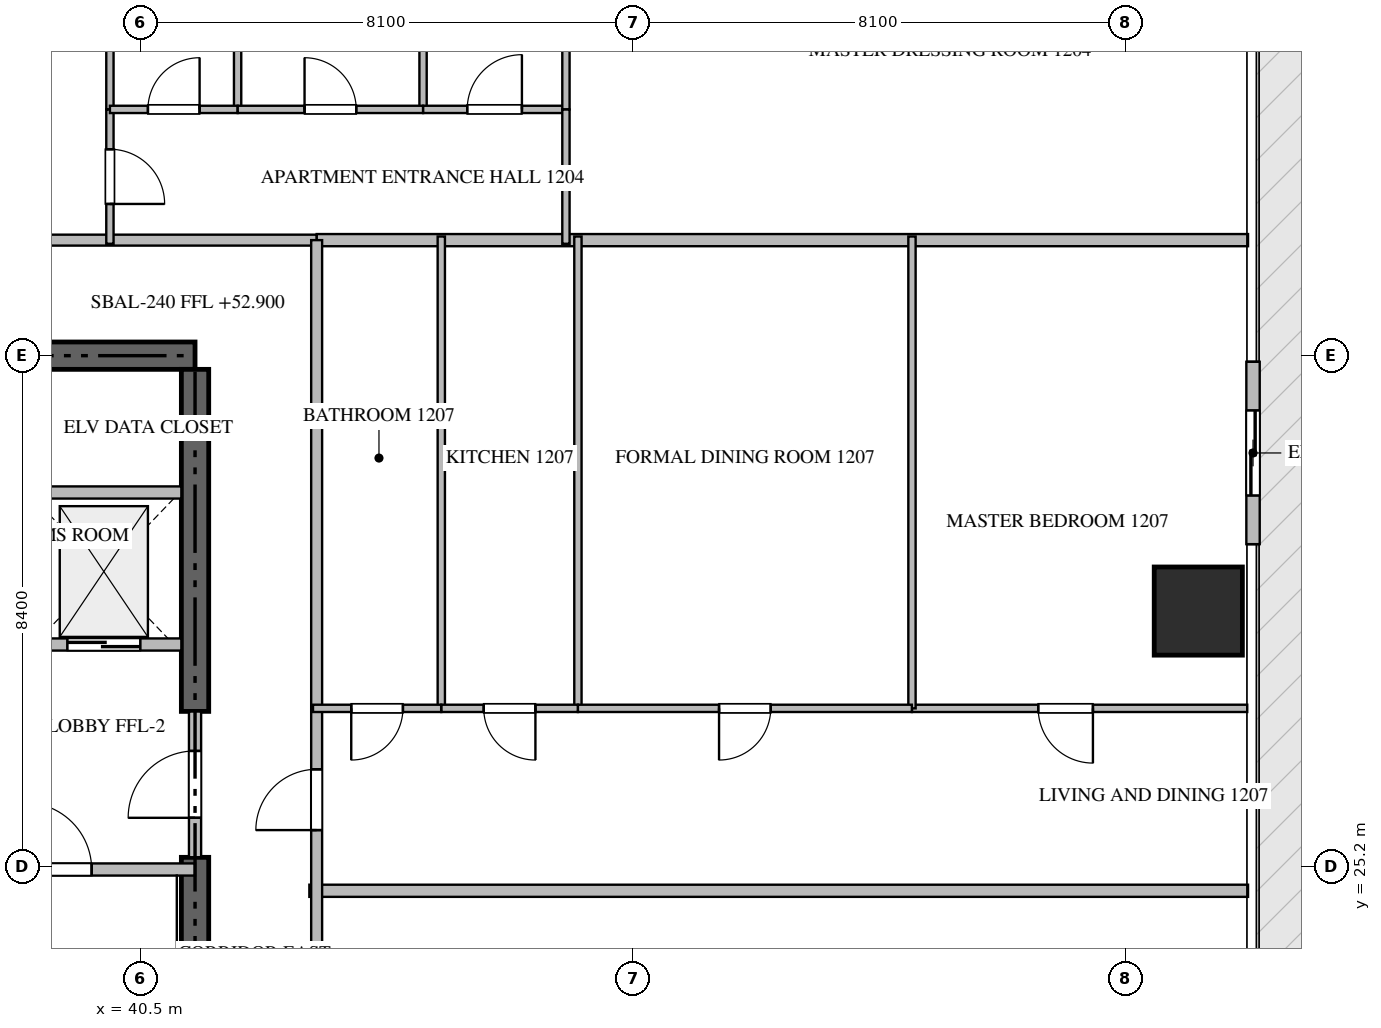
"""IFC4 building model, lengths in metres.
Left out: names, types, materials, properties, quantities, classifications, styles, units other than length and angle.
Written with IfcOpenShell. Run it as: python <this file> out.ifc"""

import sys

from ifc_helpers import new_model, si_unit, direction, frame, frame_2d, origin, origin_2d, place, context, subcontext, project, spatial, rectangle, extrude, source, transform, mapped, element, fill, save


model = new_model("IFC4")
c1 = context("Model", 3, precision=1e-05, world=origin(), true_north=direction((0.0, 1.0)))
c2 = subcontext(c1, "Body", "Model", "MODEL_VIEW")
j1 = project(units=[si_unit("LENGTHUNIT", "METRE"), si_unit("PLANEANGLEUNIT", "RADIAN")], contexts=[c1])
p1 = place(None, origin())
s1 = spatial("IfcSite", under=j1, at=p1, CompositionType="ELEMENT")
p2 = place(p1, origin())
s2 = spatial("IfcBuilding", under=s1, at=p2, CompositionType="ELEMENT")
p3 = place(p2, frame((0.0, 0.0, 52.95)))
s3 = spatial("IfcBuildingStorey", under=s2, at=p3, CompositionType="ELEMENT", Elevation=52.95)
p4 = place(p3, frame((41.4, 33.6, -0.26), z_axis=(0.0, 0.0, 1.0), x_axis=(-1.0, 0.0, 0.0)))
e1 = element("IfcWall", 1, at=p4, inside=s3, PredefinedType="SHEAR", context=c2, shape_type="SweptSolid", body=[
    extrude(rectangle(XDim=18.0, YDim=0.45, at=frame_2d((9.0, 0.0))), origin(), (0.0, 0.0, 1.0), 3.748),
])
p5 = place(p3, frame((41.4, 17.025, -0.26), z_axis=(0.0, 0.0, 1.0), x_axis=(0.0, 1.0, 0.0)))
e2 = element("IfcWall", 2, at=p5, inside=s3, PredefinedType="SHEAR", context=c2, shape_type="SweptSolid", body=[
    extrude(rectangle(XDim=8.325, YDim=0.45, at=frame_2d((4.163, 0.0))), origin(), (0.0, 0.0, 1.0), 3.748),
])
p6 = place(p3, frame((41.4, 27.75, -0.26), z_axis=(0.0, 0.0, 1.0), x_axis=(0.0, 1.0, 0.0)))
e3 = element("IfcWall", 3, at=p6, inside=s3, PredefinedType="SHEAR", context=c2, shape_type="SweptSolid", body=[
    extrude(rectangle(XDim=5.625, YDim=0.45, at=frame_2d((2.812, 0.0))), origin(), (0.0, 0.0, 1.0), 3.748),
])
m1 = source(origin(), c2, "Body", "SweptSolid", [
    extrude(rectangle(XDim=1.45, YDim=1.45, at=origin_2d()), origin(), (0.0, 0.0, 1.0), 3.75),
])
p7 = place(p3, frame((57.9, 29.4, -0.26), z_axis=(0.0, 0.0, 1.0), x_axis=(1.0, 0.0, 0.0)))
e4 = element("IfcColumn", 4, at=p7, inside=s3, PredefinedType="COLUMN", context=c2, shape_type="MappedRepresentation", body=[
    mapped(m1, transform((0.0, 0.0, 0.0), scale=1.0)),
])
p8 = place(p3, frame((58.8, 30.5, 0.0), z_axis=(0.0, 0.0, 1.0), x_axis=(0.0, 1.0, 0.0)))
e5 = element("IfcWall", 5, at=p8, inside=s3, PredefinedType="ELEMENTEDWALL", context=c2, shape_type="SweptSolid", body=[
    extrude(rectangle(XDim=3.0, YDim=0.22, at=frame_2d((1.5, 0.0))), origin(), (0.0, 0.0, 1.0), 3.475),
])
p9 = place(p8, frame((0.8, 0.0, 0.0)))
e6 = element("IfcOpeningElement", 6, at=p9, cuts=e5, PredefinedType="OPENING", context=c2, shape_type="SweptSolid", body=[
    extrude(rectangle(XDim=1.4, YDim=2.25, at=frame_2d((0.7, 1.125))), frame((0.0, 0.12, 0.0), z_axis=(0.0, -1.0, 0.0), x_axis=(1.0, 0.0, 0.0)), (0.0, 0.0, 1.0), 0.24),
])
p10 = place(p3, frame((36.95, 25.15, 0.0), z_axis=(0.0, 0.0, 1.0), x_axis=(1.0, 0.0, 0.0)))
e7 = element("IfcWall", 7, at=p10, inside=s3, PredefinedType="STANDARD", context=c2, shape_type="SweptSolid", body=[
    extrude(rectangle(XDim=4.45, YDim=0.2, at=frame_2d((2.225, 0.0))), origin(), (0.0, 0.0, 1.0), 3.49),
])
p11 = place(p10, frame((1.65, 0.0, 0.0)))
e8 = element("IfcOpeningElement", 8, at=p11, cuts=e7, PredefinedType="OPENING", context=c2, shape_type="SweptSolid", body=[
    extrude(rectangle(XDim=1.1, YDim=2.15, at=frame_2d((0.55, 1.075))), frame((0.0, 0.11, 0.0), z_axis=(0.0, -1.0, 0.0), x_axis=(1.0, 0.0, 0.0)), (0.0, 0.0, 1.0), 0.22),
])
p12 = place(p3, frame((38.75, 28.85, 0.0), z_axis=(0.0, 0.0, 1.0), x_axis=(1.0, 0.0, 0.0)))
e9 = element("IfcWall", 9, at=p12, inside=s3, PredefinedType="STANDARD", context=c2, shape_type="SweptSolid", body=[
    extrude(rectangle(XDim=2.425, YDim=0.2, at=frame_2d((1.212, 0.0))), origin(), (0.0, 0.0, 1.0), 3.49),
])
p13 = place(p12, frame((0.55, 0.0, 0.0)))
e10 = element("IfcOpeningElement", 10, at=p13, cuts=e9, PredefinedType="OPENING", context=c2, shape_type="SweptSolid", body=[
    extrude(rectangle(XDim=1.2, YDim=2.2, at=frame_2d((0.6, 1.1))), frame((0.0, 0.11, 0.0), z_axis=(0.0, -1.0, 0.0), x_axis=(1.0, 0.0, 0.0)), (0.0, 0.0, 1.0), 0.22),
])
p14 = place(p3, frame((38.75, 31.35, 0.0), z_axis=(0.0, 0.0, 1.0), x_axis=(1.0, 0.0, 0.0)))
e11 = element("IfcWall", 11, at=p14, inside=s3, PredefinedType="STANDARD", context=c2, shape_type="SweptSolid", body=[
    extrude(rectangle(XDim=2.425, YDim=0.2, at=frame_2d((1.212, 0.0))), origin(), (0.0, 0.0, 1.0), 3.49),
])
p15 = place(p3, frame((41.4, 25.352, 0.0), z_axis=(0.0, 0.0, 1.0), x_axis=(0.0, 1.0, 0.0)))
e12 = element("IfcWall", 12, at=p15, inside=s3, PredefinedType="STANDARD", context=c2, shape_type="SweptSolid", body=[
    extrude(rectangle(XDim=2.396, YDim=0.2, at=frame_2d((1.198, 0.0))), origin(), (0.0, 0.0, 1.0), 3.49),
])
p16 = place(p15, frame((0.648, 0.0, 0.0)))
e13 = element("IfcOpeningElement", 13, at=p16, cuts=e12, PredefinedType="OPENING", context=c2, shape_type="SweptSolid", body=[
    extrude(rectangle(XDim=1.1, YDim=2.15, at=frame_2d((0.55, 1.075))), frame((0.0, 0.11, 0.0), z_axis=(0.0, -1.0, 0.0), x_axis=(1.0, 0.0, 0.0)), (0.0, 0.0, 1.0), 0.22),
])
p17 = place(p3, frame((43.28, 24.8, 0.0), z_axis=(0.0, 0.0, 1.0), x_axis=(1.0, 0.0, 0.0)))
e14 = element("IfcWall", 14, at=p17, inside=s3, PredefinedType="PARTITIONING", context=c2, shape_type="SweptSolid", body=[
    extrude(rectangle(XDim=15.438, YDim=0.2, at=frame_2d((7.719, 0.0))), origin(), (0.0, 0.0, 1.0), 3.49),
])
p18 = place(p3, frame((43.4, 35.5, 0.0), z_axis=(0.0, 0.0, 1.0), x_axis=(1.0, 0.0, 0.0)))
e15 = element("IfcWall", 15, at=p18, inside=s3, PredefinedType="PARTITIONING", context=c2, shape_type="SweptSolid", body=[
    extrude(rectangle(XDim=15.318, YDim=0.2, at=frame_2d((7.659, 0.0))), origin(), (0.0, 0.0, 1.0), 3.49),
])
p19 = place(p3, frame((21.402, 35.5, 0.0), z_axis=(0.0, 0.0, 1.0), x_axis=(1.0, 0.0, 0.0)))
e16 = element("IfcWall", 16, at=p19, inside=s3, PredefinedType="PARTITIONING", context=c2, shape_type="SweptSolid", body=[
    extrude(rectangle(XDim=21.996, YDim=0.18, at=frame_2d((10.998, 0.0))), origin(), (0.0, 0.0, 1.0), 3.49),
])
p20 = place(p19, frame((15.222, 0.0, 0.0)))
e17 = element("IfcOpeningElement", 17, at=p20, cuts=e16, PredefinedType="OPENING", context=c2, shape_type="SweptSolid", body=[
    extrude(rectangle(XDim=1.0, YDim=2.15, at=frame_2d((0.5, 1.075))), frame((0.0, 0.1, 0.0), z_axis=(0.0, -1.0, 0.0), x_axis=(1.0, 0.0, 0.0)), (0.0, 0.0, 1.0), 0.2),
])
p21 = place(p3, frame((43.4, 14.9, 0.0), z_axis=(0.0, 0.0, 1.0), x_axis=(0.0, 1.0, 0.0)))
e18 = element("IfcWall", 18, at=p21, inside=s3, PredefinedType="PARTITIONING", context=c2, shape_type="SweptSolid", body=[
    extrude(rectangle(XDim=20.6, YDim=0.18, at=frame_2d((10.3, 0.0))), origin(), (0.0, 0.0, 1.0), 3.49),
])
p22 = place(p21, frame((5.821, 0.0, 0.0)))
e19 = element("IfcOpeningElement", 19, at=p22, cuts=e18, PredefinedType="OPENING", context=c2, shape_type="SweptSolid", body=[
    extrude(rectangle(XDim=1.0, YDim=2.15, at=frame_2d((0.5, 1.075))), frame((0.0, 0.1, 0.0), z_axis=(0.0, -1.0, 0.0), x_axis=(1.0, 0.0, 0.0)), (0.0, 0.0, 1.0), 0.2),
])
p23 = place(p21, frame((10.898, 0.0, 0.0)))
e20 = element("IfcOpeningElement", 20, at=p23, cuts=e18, PredefinedType="OPENING", context=c2, shape_type="SweptSolid", body=[
    extrude(rectangle(XDim=1.0, YDim=2.15, at=frame_2d((0.5, 1.075))), frame((0.0, 0.1, 0.0), z_axis=(0.0, -1.0, 0.0), x_axis=(1.0, 0.0, 0.0)), (0.0, 0.0, 1.0), 0.2),
])
p24 = place(p3, frame((40.0, 37.65, 0.0), z_axis=(0.0, 0.0, 1.0), x_axis=(0.0, -1.0, 0.0)))
e21 = element("IfcWall", 21, at=p24, inside=s3, PredefinedType="PARTITIONING", context=c2, shape_type="SweptSolid", body=[
    extrude(rectangle(XDim=2.21, YDim=0.12, at=frame_2d((1.105, 0.0))), origin(), (0.0, 0.0, 1.0), 3.49),
])
p25 = place(p24, frame((0.655, 0.0, 0.0)))
e22 = element("IfcOpeningElement", 22, at=p25, cuts=e21, PredefinedType="OPENING", context=c2, shape_type="SweptSolid", body=[
    extrude(rectangle(XDim=0.9, YDim=2.1, at=frame_2d((0.45, 1.05))), frame((0.0, 0.07, 0.0), z_axis=(0.0, -1.0, 0.0), x_axis=(1.0, 0.0, 0.0)), (0.0, 0.0, 1.0), 0.14),
])
p26 = place(p3, frame((40.0, 43.538, 0.0), z_axis=(0.0, 0.0, 1.0), x_axis=(0.0, -1.0, 0.0)))
e23 = element("IfcWall", 23, at=p26, inside=s3, PredefinedType="PARTITIONING", context=c2, shape_type="SweptSolid", body=[
    extrude(rectangle(XDim=5.886, YDim=0.12, at=frame_2d((2.943, 0.0))), origin(), (0.0, 0.0, 1.0), 3.49),
])
p27 = place(p3, frame((45.15, 50.105, 0.0), z_axis=(0.0, 0.0, 1.0), x_axis=(0.0, -1.0, 0.0)))
e24 = element("IfcWall", 24, at=p27, inside=s3, PredefinedType="PARTITIONING", context=c2, shape_type="SweptSolid", body=[
    extrude(rectangle(XDim=12.455, YDim=0.12, at=frame_2d((6.228, 0.0))), origin(), (0.0, 0.0, 1.0), 3.49),
])
p28 = place(p3, frame((42.1, 43.54, 0.0), z_axis=(0.0, 0.0, 1.0), x_axis=(0.0, -1.0, 0.0)))
e25 = element("IfcWall", 25, at=p28, inside=s3, PredefinedType="PARTITIONING", context=c2, shape_type="SweptSolid", body=[
    extrude(rectangle(XDim=5.89, YDim=0.12, at=frame_2d((2.945, 0.0))), origin(), (0.0, 0.0, 1.0), 3.49),
])
p29 = place(p3, frame((40.0, 37.65, 0.0), z_axis=(0.0, 0.0, 1.0), x_axis=(1.0, 0.0, 0.0)))
e26 = element("IfcWall", 26, at=p29, inside=s3, PredefinedType="PARTITIONING", context=c2, shape_type="SweptSolid", body=[
    extrude(rectangle(XDim=2.1, YDim=0.12, at=frame_2d((1.05, 0.0))), origin(), (0.0, 0.0, 1.0), 3.49),
])
p30 = place(p29, frame((0.625, 0.0, 0.0)))
e27 = element("IfcOpeningElement", 27, at=p30, cuts=e26, PredefinedType="OPENING", context=c2, shape_type="SweptSolid", body=[
    extrude(rectangle(XDim=0.85, YDim=2.1, at=frame_2d((0.425, 1.05))), frame((0.0, 0.07, 0.0), z_axis=(0.0, -1.0, 0.0), x_axis=(1.0, 0.0, 0.0)), (0.0, 0.0, 1.0), 0.14),
])
p31 = place(p3, frame((42.102, 37.65, 0.0), z_axis=(0.0, 0.0, 1.0), x_axis=(1.0, 0.0, 0.0)))
e28 = element("IfcWall", 28, at=p31, inside=s3, PredefinedType="PARTITIONING", context=c2, shape_type="SweptSolid", body=[
    extrude(rectangle(XDim=3.048, YDim=0.12, at=frame_2d((1.524, 0.0))), origin(), (0.0, 0.0, 1.0), 3.49),
])
p32 = place(p31, frame((1.099, 0.0, 0.0)))
e29 = element("IfcOpeningElement", 29, at=p32, cuts=e28, PredefinedType="OPENING", context=c2, shape_type="SweptSolid", body=[
    extrude(rectangle(XDim=0.85, YDim=2.1, at=frame_2d((0.425, 1.05))), frame((0.0, 0.07, 0.0), z_axis=(0.0, -1.0, 0.0), x_axis=(1.0, 0.0, 0.0)), (0.0, 0.0, 1.0), 0.14),
])
p33 = place(p3, frame((45.152, 37.65, 0.0), z_axis=(0.0, 0.0, 1.0), x_axis=(1.0, 0.0, 0.0)))
e30 = element("IfcWall", 30, at=p33, inside=s3, PredefinedType="PARTITIONING", context=c2, shape_type="SweptSolid", body=[
    extrude(rectangle(XDim=2.348, YDim=0.12, at=frame_2d((1.174, 0.0))), origin(), (0.0, 0.0, 1.0), 3.49),
])
p34 = place(p33, frame((0.724, 0.0, 0.0)))
e31 = element("IfcOpeningElement", 31, at=p34, cuts=e30, PredefinedType="OPENING", context=c2, shape_type="SweptSolid", body=[
    extrude(rectangle(XDim=0.9, YDim=2.1, at=frame_2d((0.45, 1.05))), frame((0.0, 0.07, 0.0), z_axis=(0.0, -1.0, 0.0), x_axis=(1.0, 0.0, 0.0)), (0.0, 0.0, 1.0), 0.14),
])
p35 = place(p3, frame((47.5, 40.636, 0.0), z_axis=(0.0, 0.0, 1.0), x_axis=(0.0, -1.0, 0.0)))
e32 = element("IfcWall", 32, at=p35, inside=s3, PredefinedType="PARTITIONING", context=c2, shape_type="SweptSolid", body=[
    extrude(rectangle(XDim=2.986, YDim=0.12, at=frame_2d((1.493, 0.0))), origin(), (0.0, 0.0, 1.0), 3.49),
])
p36 = place(p35, frame((1.068, 0.0, 0.0)))
e33 = element("IfcOpeningElement", 33, at=p36, cuts=e32, PredefinedType="OPENING", context=c2, shape_type="SweptSolid", body=[
    extrude(rectangle(XDim=0.85, YDim=2.1, at=frame_2d((0.425, 1.05))), frame((0.0, 0.07, 0.0), z_axis=(0.0, -1.0, 0.0), x_axis=(1.0, 0.0, 0.0)), (0.0, 0.0, 1.0), 0.14),
])
p37 = place(p3, frame((47.5, 37.648, 0.0), z_axis=(0.0, 0.0, 1.0), x_axis=(0.0, -1.0, 0.0)))
e34 = element("IfcWall", 34, at=p37, inside=s3, PredefinedType="PARTITIONING", context=c2, shape_type="SweptSolid", body=[
    extrude(rectangle(XDim=2.208, YDim=0.12, at=frame_2d((1.104, 0.0))), origin(), (0.0, 0.0, 1.0), 3.49),
])
p38 = place(p3, frame((58.705, 27.8, 0.0), z_axis=(0.0, 0.0, 1.0), x_axis=(-1.0, 0.0, 0.0)))
e35 = element("IfcWall", 35, at=p38, inside=s3, PredefinedType="PARTITIONING", context=c2, shape_type="SweptSolid", body=[
    extrude(rectangle(XDim=5.514, YDim=0.12, at=frame_2d((2.757, 0.0))), origin(), (0.0, 0.0, 1.0), 3.49),
])
p39 = place(p38, frame((2.538, 0.0, 0.0)))
e36 = element("IfcOpeningElement", 36, at=p39, cuts=e35, PredefinedType="OPENING", context=c2, shape_type="SweptSolid", body=[
    extrude(rectangle(XDim=0.9, YDim=2.1, at=frame_2d((0.45, 1.05))), frame((0.0, 0.07, 0.0), z_axis=(0.0, -1.0, 0.0), x_axis=(1.0, 0.0, 0.0)), (0.0, 0.0, 1.0), 0.14),
])
for number, where, z_axis, x_axis in (
    (37, (53.191, 27.8, 0.0), (0.0, 0.0, 1.0), (0.0, 1.0, 0.0)),
    (38, (47.697, 27.8, 0.0), (0.0, 0.0, 1.0), (0.0, 1.0, 0.0)),
    (39, (45.45, 27.8, 0.0), (0.0, 0.0, 1.0), (0.0, 1.0, 0.0)),
):
    element("IfcWall", number, at=place(p3, frame(where, z_axis=z_axis, x_axis=x_axis)), inside=s3, PredefinedType="PARTITIONING", context=c2, shape_type="SweptSolid", body=[
        extrude(rectangle(XDim=7.76, YDim=0.12, at=frame_2d((3.88, 0.0))), origin(), (0.0, 0.0, 1.0), 3.49),
    ])
p40 = place(p3, frame((53.189, 27.8, 0.0), z_axis=(0.0, 0.0, 1.0), x_axis=(-1.0, 0.0, 0.0)))
e40 = element("IfcWall", 40, at=p40, inside=s3, PredefinedType="PARTITIONING", context=c2, shape_type="SweptSolid", body=[
    extrude(rectangle(XDim=5.492, YDim=0.12, at=frame_2d((2.746, 0.0))), origin(), (0.0, 0.0, 1.0), 3.49),
])
p41 = place(p40, frame((2.321, 0.0, 0.0)))
e41 = element("IfcOpeningElement", 41, at=p41, cuts=e40, PredefinedType="OPENING", context=c2, shape_type="SweptSolid", body=[
    extrude(rectangle(XDim=0.85, YDim=2.1, at=frame_2d((0.425, 1.05))), frame((0.0, 0.07, 0.0), z_axis=(0.0, -1.0, 0.0), x_axis=(1.0, 0.0, 0.0)), (0.0, 0.0, 1.0), 0.14),
])
p42 = place(p3, frame((47.695, 27.8, 0.0), z_axis=(0.0, 0.0, 1.0), x_axis=(-1.0, 0.0, 0.0)))
e42 = element("IfcWall", 42, at=p42, inside=s3, PredefinedType="PARTITIONING", context=c2, shape_type="SweptSolid", body=[
    extrude(rectangle(XDim=2.245, YDim=0.12, at=frame_2d((1.123, 0.0))), origin(), (0.0, 0.0, 1.0), 3.49),
])
p43 = place(p42, frame((0.697, 0.0, 0.0)))
e43 = element("IfcOpeningElement", 43, at=p43, cuts=e42, PredefinedType="OPENING", context=c2, shape_type="SweptSolid", body=[
    extrude(rectangle(XDim=0.85, YDim=2.1, at=frame_2d((0.425, 1.05))), frame((0.0, 0.07, 0.0), z_axis=(0.0, -1.0, 0.0), x_axis=(1.0, 0.0, 0.0)), (0.0, 0.0, 1.0), 0.14),
])
p44 = place(p3, frame((45.448, 27.8, 0.0), z_axis=(0.0, 0.0, 1.0), x_axis=(-1.0, 0.0, 0.0)))
e44 = element("IfcWall", 44, at=p44, inside=s3, PredefinedType="PARTITIONING", context=c2, shape_type="SweptSolid", body=[
    extrude(rectangle(XDim=2.108, YDim=0.12, at=frame_2d((1.054, 0.0))), origin(), (0.0, 0.0, 1.0), 3.49),
])
p45 = place(p44, frame((0.629, 0.0, 0.0)))
e45 = element("IfcOpeningElement", 45, at=p45, cuts=e44, PredefinedType="OPENING", context=c2, shape_type="SweptSolid", body=[
    extrude(rectangle(XDim=0.85, YDim=2.1, at=frame_2d((0.425, 1.05))), frame((0.0, 0.07, 0.0), z_axis=(0.0, -1.0, 0.0), x_axis=(1.0, 0.0, 0.0)), (0.0, 0.0, 1.0), 0.14),
])
m2 = source(origin(), c2, "Body", "SweptSolid", [
    extrude(rectangle(XDim=1.4, YDim=2.25, at=frame_2d((0.7, 1.125))), frame((0.0, 0.025, 0.0), z_axis=(0.0, -1.0, 0.0), x_axis=(1.0, 0.0, 0.0)), (0.0, 0.0, 1.0), 0.05),
])
p46 = place(p9, origin())
e46 = element("IfcDoor", 46, at=p46, inside=s3, OperationType="SLIDING_TO_LEFT", PredefinedType="DOOR", context=c2, shape_type="MappedRepresentation", body=[
    mapped(m2, transform((0.0, 0.0, 0.0), scale=1.0)),
])
fill(e6, e46)
m3 = source(origin(), c2, "Body", "SweptSolid", [
    extrude(rectangle(XDim=1.1, YDim=2.15, at=frame_2d((0.55, 1.075))), frame((0.0, 0.025, 0.0), z_axis=(0.0, -1.0, 0.0), x_axis=(1.0, 0.0, 0.0)), (0.0, 0.0, 1.0), 0.05),
])
p47 = place(p11, origin())
e47 = element("IfcDoor", 47, at=p47, inside=s3, OperationType="SINGLE_SWING_LEFT", PredefinedType="DOOR", context=c2, shape_type="MappedRepresentation", body=[
    mapped(m3, transform((0.0, 0.0, 0.0), scale=1.0)),
])
fill(e8, e47)
m4 = source(origin(), c2, "Body", "SweptSolid", [
    extrude(rectangle(XDim=1.2, YDim=2.2, at=frame_2d((0.6, 1.1))), frame((0.0, 0.025, 0.0), z_axis=(0.0, -1.0, 0.0), x_axis=(1.0, 0.0, 0.0)), (0.0, 0.0, 1.0), 0.05),
])
p48 = place(p13, origin())
e48 = element("IfcDoor", 48, at=p48, inside=s3, OperationType="DOUBLE_DOOR_SLIDING", PredefinedType="DOOR", context=c2, shape_type="MappedRepresentation", body=[
    mapped(m4, transform((0.0, 0.0, 0.0), scale=1.0)),
])
fill(e10, e48)
p49 = place(p16, origin())
e49 = element("IfcDoor", 49, at=p49, inside=s3, OperationType="SINGLE_SWING_LEFT", PredefinedType="DOOR", context=c2, shape_type="MappedRepresentation", body=[
    mapped(m3, transform((0.0, 0.0, 0.0), scale=1.0)),
])
fill(e13, e49)
m5 = source(origin(), c2, "Body", "SweptSolid", [
    extrude(rectangle(XDim=1.0, YDim=2.15, at=frame_2d((0.5, 1.075))), frame((0.0, 0.025, 0.0), z_axis=(0.0, -1.0, 0.0), x_axis=(1.0, 0.0, 0.0)), (0.0, 0.0, 1.0), 0.05),
])
p50 = place(p23, origin())
e50 = element("IfcDoor", 50, at=p50, inside=s3, OperationType="SINGLE_SWING_LEFT", PredefinedType="DOOR", context=c2, shape_type="MappedRepresentation", body=[
    mapped(m5, transform((0.0, 0.0, 0.0), scale=1.0)),
])
fill(e20, e50)
m6 = source(origin(), c2, "Body", "SweptSolid", [
    extrude(rectangle(XDim=0.9, YDim=2.1, at=frame_2d((0.45, 1.05))), frame((0.0, 0.025, 0.0), z_axis=(0.0, -1.0, 0.0), x_axis=(1.0, 0.0, 0.0)), (0.0, 0.0, 1.0), 0.05),
])
p51 = place(p25, origin())
e51 = element("IfcDoor", 51, at=p51, inside=s3, OperationType="SINGLE_SWING_RIGHT", PredefinedType="DOOR", context=c2, shape_type="MappedRepresentation", body=[
    mapped(m6, transform((0.0, 0.0, 0.0), scale=1.0)),
])
fill(e22, e51)
m7 = source(origin(), c2, "Body", "SweptSolid", [
    extrude(rectangle(XDim=0.85, YDim=2.1, at=frame_2d((0.425, 1.05))), frame((0.0, 0.025, 0.0), z_axis=(0.0, -1.0, 0.0), x_axis=(1.0, 0.0, 0.0)), (0.0, 0.0, 1.0), 0.05),
])
p52 = place(p30, origin())
e52 = element("IfcDoor", 52, at=p52, inside=s3, OperationType="SINGLE_SWING_RIGHT", PredefinedType="DOOR", context=c2, shape_type="MappedRepresentation", body=[
    mapped(m7, transform((0.0, 0.0, 0.0), scale=1.0)),
])
fill(e27, e52)
p53 = place(p32, origin())
e53 = element("IfcDoor", 53, at=p53, inside=s3, OperationType="SINGLE_SWING_LEFT", PredefinedType="DOOR", context=c2, shape_type="MappedRepresentation", body=[
    mapped(m7, transform((0.0, 0.0, 0.0), scale=1.0)),
])
fill(e29, e53)
p54 = place(p34, origin())
e54 = element("IfcDoor", 54, at=p54, inside=s3, OperationType="SINGLE_SWING_RIGHT", PredefinedType="DOOR", context=c2, shape_type="MappedRepresentation", body=[
    mapped(m6, transform((0.0, 0.0, 0.0), scale=1.0)),
])
fill(e31, e54)
p55 = place(p39, origin())
e55 = element("IfcDoor", 55, at=p55, inside=s3, OperationType="SINGLE_SWING_LEFT", PredefinedType="DOOR", context=c2, shape_type="MappedRepresentation", body=[
    mapped(m6, transform((0.0, 0.0, 0.0), scale=1.0)),
])
fill(e36, e55)
p56 = place(p41, origin())
e56 = element("IfcDoor", 56, at=p56, inside=s3, OperationType="SINGLE_SWING_RIGHT", PredefinedType="DOOR", context=c2, shape_type="MappedRepresentation", body=[
    mapped(m7, transform((0.0, 0.0, 0.0), scale=1.0)),
])
fill(e41, e56)
p57 = place(p43, origin())
e57 = element("IfcDoor", 57, at=p57, inside=s3, OperationType="SINGLE_SWING_LEFT", PredefinedType="DOOR", context=c2, shape_type="MappedRepresentation", body=[
    mapped(m7, transform((0.0, 0.0, 0.0), scale=1.0)),
])
fill(e43, e57)
p58 = place(p45, origin())
e58 = element("IfcDoor", 58, at=p58, inside=s3, OperationType="SINGLE_SWING_RIGHT", PredefinedType="DOOR", context=c2, shape_type="MappedRepresentation", body=[
    mapped(m7, transform((0.0, 0.0, 0.0), scale=1.0)),
])
fill(e45, e58)
save(model, sys.argv[1])
